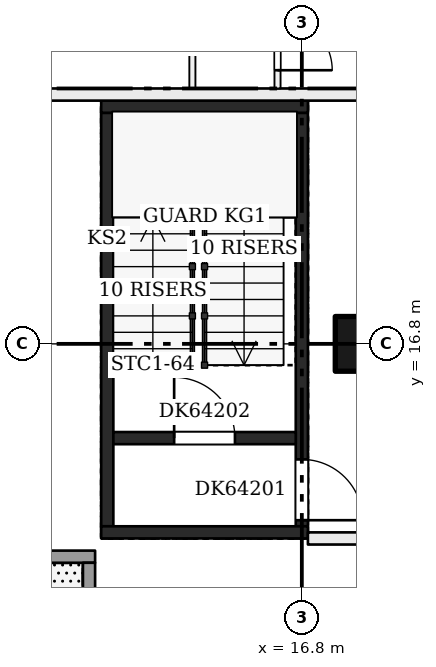
"""IFC4 building model, lengths in metres.
Left out: names, types, materials, properties, quantities, classifications, styles, units other than length and angle.
Written with IfcOpenShell. Run it as: python <this file> out.ifc"""

import sys

from ifc_helpers import new_model, si_unit, direction, frame, frame_2d, origin, origin_2d, place, context, subcontext, project, spatial, rectangle, extrude, element, fill, save


model = new_model("IFC4")
c1 = context("Model", 3, precision=1e-05, world=origin(), true_north=direction((0.0, 1.0)))
c2 = subcontext(c1, "Body", "Model", "MODEL_VIEW")
j1 = project(units=[si_unit("LENGTHUNIT", "METRE"), si_unit("PLANEANGLEUNIT", "RADIAN")], contexts=[c1])
p1 = place(None, origin())
s1 = spatial("IfcSite", under=j1, at=p1, CompositionType="ELEMENT")
p2 = place(p1, origin())
s2 = spatial("IfcBuilding", under=s1, at=p2, CompositionType="ELEMENT")
p3 = place(p2, frame((0.0, 0.0, 245.7)))
s3 = spatial("IfcBuildingStorey", under=s2, at=p3, CompositionType="ELEMENT", Elevation=245.7)
p4 = place(p3, frame((17.8, 16.8, 0.0), z_axis=(0.0, 0.0, 1.0), x_axis=(1.0, 0.0, 0.0)))
e1 = element("IfcColumn", 1, at=p4, inside=s3, PredefinedType="COLUMN", context=c2, shape_type="SweptSolid", body=[
    extrude(rectangle(XDim=0.9, YDim=0.9, at=origin_2d()), origin(), (0.0, 0.0, 1.0), 3.22),
])
p5 = place(p3, frame((13.6, 13.8, 0.0), z_axis=(0.0, 0.0, 1.0), x_axis=(0.0, 1.0, 0.0)))
e2 = element("IfcWall", 2, at=p5, inside=s3, PredefinedType="SHEAR", context=c2, shape_type="SweptSolid", body=[
    extrude(rectangle(XDim=6.8, YDim=0.2, at=frame_2d((3.4, 0.0))), origin(), (0.0, 0.0, 1.0), 3.22),
])
p6 = place(p3, frame((16.8, 13.8, 0.0), z_axis=(0.0, 0.0, 1.0), x_axis=(0.0, 1.0, 0.0)))
e3 = element("IfcWall", 3, at=p6, inside=s3, PredefinedType="SHEAR", context=c2, shape_type="SweptSolid", body=[
    extrude(rectangle(XDim=6.8, YDim=0.2, at=frame_2d((3.4, 0.0))), origin(), (0.0, 0.0, 1.0), 3.22),
])
p7 = place(p6, frame((0.1, 0.0, 0.0)))
e4 = element("IfcOpeningElement", 4, at=p7, cuts=e3, PredefinedType="OPENING", context=c2, shape_type="SweptSolid", body=[
    extrude(rectangle(XDim=1.0, YDim=2.1, at=frame_2d((0.5, 1.05))), frame((0.0, 0.11, 0.0), z_axis=(0.0, -1.0, 0.0), x_axis=(1.0, 0.0, 0.0)), (0.0, 0.0, 1.0), 0.22),
])
for number, where, z_axis, x_axis in (
    (5, (13.5, 13.7, 0.0), (0.0, 0.0, 1.0), (1.0, 0.0, 0.0)),
    (6, (13.5, 20.7, 0.0), (0.0, 0.0, 1.0), (1.0, 0.0, 0.0)),
):
    element("IfcWall", number, at=place(p3, frame(where, z_axis=z_axis, x_axis=x_axis)), inside=s3, PredefinedType="SHEAR", context=c2, shape_type="SweptSolid", body=[
        extrude(rectangle(XDim=3.4, YDim=0.2, at=frame_2d((1.7, 0.0))), origin(), (0.0, 0.0, 1.0), 3.22),
    ])
p8 = place(p3, frame((13.7, 15.25, 0.0), z_axis=(0.0, 0.0, 1.0), x_axis=(1.0, 0.0, 0.0)))
e7 = element("IfcWall", 7, at=p8, inside=s3, PredefinedType="SHEAR", context=c2, shape_type="SweptSolid", body=[
    extrude(rectangle(XDim=3.0, YDim=0.2, at=frame_2d((1.5, 0.0))), origin(), (0.0, 0.0, 1.0), 3.22),
])
p9 = place(p8, frame((1.0, 0.0, 0.0)))
e8 = element("IfcOpeningElement", 8, at=p9, cuts=e7, PredefinedType="OPENING", context=c2, shape_type="SweptSolid", body=[
    extrude(rectangle(XDim=1.0, YDim=2.1, at=frame_2d((0.5, 1.05))), frame((0.0, 0.11, 0.0), z_axis=(0.0, -1.0, 0.0), x_axis=(1.0, 0.0, 0.0)), (0.0, 0.0, 1.0), 0.22),
])
p10 = place(p3, frame((16.9, 13.6, 0.0), z_axis=(0.0, 0.0, 1.0), x_axis=(1.0, 0.0, 0.0)))
e9 = element("IfcWall", 9, at=p10, inside=s3, PredefinedType="PARTITIONING", context=c2, shape_type="SweptSolid", body=[
    extrude(rectangle(XDim=4.2, YDim=0.2, at=frame_2d((2.1, 0.0))), origin(), (0.0, 0.0, 1.0), 3.22),
])
p11 = place(p10, frame((1.6, 0.0, 0.0)))
e10 = element("IfcOpeningElement", 10, at=p11, cuts=e9, PredefinedType="OPENING", context=c2, shape_type="SweptSolid", body=[
    extrude(rectangle(XDim=1.0, YDim=2.1, at=frame_2d((0.5, 1.05))), frame((0.0, 0.11, 0.0), z_axis=(0.0, -1.0, 0.0), x_axis=(1.0, 0.0, 0.0)), (0.0, 0.0, 1.0), 0.22),
])
p12 = place(p3, frame((10.9, 20.9, 0.0), z_axis=(0.0, 0.0, 1.0), x_axis=(1.0, 0.0, 0.0)))
e11 = element("IfcWall", 11, at=p12, inside=s3, PredefinedType="PARTITIONING", context=c2, shape_type="SweptSolid", body=[
    extrude(rectangle(XDim=8.3, YDim=0.2, at=frame_2d((4.15, 0.0))), origin(), (0.0, 0.0, 1.0), 3.22),
])
p13 = place(p3, frame((15.0, 21.0, 0.0), z_axis=(0.0, 0.0, 1.0), x_axis=(0.0, 1.0, 0.0)))
e12 = element("IfcWall", 12, at=p13, inside=s3, PredefinedType="PARTITIONING", context=c2, shape_type="SweptSolid", body=[
    extrude(rectangle(XDim=19.0, YDim=0.1, at=frame_2d((9.5, 0.0))), origin(), (0.0, 0.0, 1.0), 3.22),
])
p14 = place(p13, frame((1.6, 0.0, 0.0)))
e13 = element("IfcOpeningElement", 13, at=p14, cuts=e12, PredefinedType="OPENING", context=c2, shape_type="SweptSolid", body=[
    extrude(rectangle(XDim=0.9, YDim=2.1, at=frame_2d((0.45, 1.05))), frame((0.0, 0.06, 0.0), z_axis=(0.0, -1.0, 0.0), x_axis=(1.0, 0.0, 0.0)), (0.0, 0.0, 1.0), 0.12),
])
p15 = place(p13, frame((5.8, 0.0, 0.0)))
e14 = element("IfcOpeningElement", 14, at=p15, cuts=e12, PredefinedType="OPENING", context=c2, shape_type="SweptSolid", body=[
    extrude(rectangle(XDim=0.9, YDim=2.1, at=frame_2d((0.45, 1.05))), frame((0.0, 0.06, 0.0), z_axis=(0.0, -1.0, 0.0), x_axis=(1.0, 0.0, 0.0)), (0.0, 0.0, 1.0), 0.12),
])
p16 = place(p13, frame((10.0, 0.0, 0.0)))
e15 = element("IfcOpeningElement", 15, at=p16, cuts=e12, PredefinedType="OPENING", context=c2, shape_type="SweptSolid", body=[
    extrude(rectangle(XDim=0.9, YDim=2.1, at=frame_2d((0.45, 1.05))), frame((0.0, 0.06, 0.0), z_axis=(0.0, -1.0, 0.0), x_axis=(1.0, 0.0, 0.0)), (0.0, 0.0, 1.0), 0.12),
])
p17 = place(p13, frame((15.4, 0.0, 0.0)))
e16 = element("IfcOpeningElement", 16, at=p17, cuts=e12, PredefinedType="OPENING", context=c2, shape_type="SweptSolid", body=[
    extrude(rectangle(XDim=0.9, YDim=2.1, at=frame_2d((0.45, 1.05))), frame((0.0, 0.06, 0.0), z_axis=(0.0, -1.0, 0.0), x_axis=(1.0, 0.0, 0.0)), (0.0, 0.0, 1.0), 0.12),
])
p18 = place(p3, frame((16.4, 21.0, 0.0), z_axis=(0.0, 0.0, 1.0), x_axis=(0.0, 1.0, 0.0)))
e17 = element("IfcWall", 17, at=p18, inside=s3, PredefinedType="PARTITIONING", context=c2, shape_type="SweptSolid", body=[
    extrude(rectangle(XDim=19.0, YDim=0.1, at=frame_2d((9.5, 0.0))), origin(), (0.0, 0.0, 1.0), 3.22),
])
p19 = place(p18, frame((2.6, 0.0, 0.0)))
e18 = element("IfcOpeningElement", 18, at=p19, cuts=e17, PredefinedType="OPENING", context=c2, shape_type="SweptSolid", body=[
    extrude(rectangle(XDim=0.9, YDim=2.1, at=frame_2d((0.45, 1.05))), frame((0.0, 0.06, 0.0), z_axis=(0.0, -1.0, 0.0), x_axis=(1.0, 0.0, 0.0)), (0.0, 0.0, 1.0), 0.12),
])
p20 = place(p18, frame((0.3, 0.0, 0.0)))
e19 = element("IfcOpeningElement", 19, at=p20, cuts=e17, PredefinedType="OPENING", context=c2, shape_type="SweptSolid", body=[
    extrude(rectangle(XDim=0.9, YDim=2.1, at=frame_2d((0.45, 1.05))), frame((0.0, 0.06, 0.0), z_axis=(0.0, -1.0, 0.0), x_axis=(1.0, 0.0, 0.0)), (0.0, 0.0, 1.0), 0.12),
])
p21 = place(p18, frame((7.3, 0.0, 0.0)))
e20 = element("IfcOpeningElement", 20, at=p21, cuts=e17, PredefinedType="OPENING", context=c2, shape_type="SweptSolid", body=[
    extrude(rectangle(XDim=0.9, YDim=2.1, at=frame_2d((0.45, 1.05))), frame((0.0, 0.06, 0.0), z_axis=(0.0, -1.0, 0.0), x_axis=(1.0, 0.0, 0.0)), (0.0, 0.0, 1.0), 0.12),
])
p22 = place(p18, frame((11.0, 0.0, 0.0)))
e21 = element("IfcOpeningElement", 21, at=p22, cuts=e17, PredefinedType="OPENING", context=c2, shape_type="SweptSolid", body=[
    extrude(rectangle(XDim=0.9, YDim=2.1, at=frame_2d((0.45, 1.05))), frame((0.0, 0.06, 0.0), z_axis=(0.0, -1.0, 0.0), x_axis=(1.0, 0.0, 0.0)), (0.0, 0.0, 1.0), 0.12),
])
p23 = place(p18, frame((16.1, 0.0, 0.0)))
e22 = element("IfcOpeningElement", 22, at=p23, cuts=e17, PredefinedType="OPENING", context=c2, shape_type="SweptSolid", body=[
    extrude(rectangle(XDim=0.9, YDim=2.1, at=frame_2d((0.45, 1.05))), frame((0.0, 0.06, 0.0), z_axis=(0.0, -1.0, 0.0), x_axis=(1.0, 0.0, 0.0)), (0.0, 0.0, 1.0), 0.12),
])
p24 = place(p3, frame((10.8, 13.3, 0.0), z_axis=(0.0, 0.0, 1.0), x_axis=(1.0, 0.0, 0.0)))
e23 = element("IfcWall", 23, at=p24, inside=s3, PredefinedType="SOLIDWALL", context=c2, shape_type="SweptSolid", body=[
    extrude(rectangle(XDim=2.6, YDim=0.2, at=frame_2d((1.3, 0.0))), origin(), (0.0, 0.0, 1.0), 3.22),
])
p25 = place(p3, frame((13.3, 13.2, 0.0), z_axis=(0.0, 0.0, 1.0), x_axis=(0.0, -1.0, 0.0)))
e24 = element("IfcWall", 24, at=p25, inside=s3, PredefinedType="SOLIDWALL", context=c2, shape_type="SweptSolid", body=[
    extrude(rectangle(XDim=2.2, YDim=0.2, at=frame_2d((1.1, 0.0))), origin(), (0.0, 0.0, 1.0), 3.22),
])
p26 = place(p7, frame((1.0, 0.0, 0.0), z_axis=(0.0, 0.0, 1.0), x_axis=(-1.0, 0.0, 0.0)))
e25 = element("IfcDoor", 25, at=p26, inside=s3, OperationType="SINGLE_SWING_RIGHT", PredefinedType="DOOR", context=c2, shape_type="SweptSolid", body=[
    extrude(rectangle(XDim=1.0, YDim=2.1, at=frame_2d((0.5, 1.05))), frame((0.0, 0.025, 0.0), z_axis=(0.0, -1.0, 0.0), x_axis=(1.0, 0.0, 0.0)), (0.0, 0.0, 1.0), 0.05),
])
fill(e4, e25)
p27 = place(p9, origin())
e26 = element("IfcDoor", 26, at=p27, inside=s3, OperationType="SINGLE_SWING_LEFT", PredefinedType="DOOR", context=c2, shape_type="SweptSolid", body=[
    extrude(rectangle(XDim=1.0, YDim=2.1, at=frame_2d((0.5, 1.05))), frame((0.0, 0.025, 0.0), z_axis=(0.0, -1.0, 0.0), x_axis=(1.0, 0.0, 0.0)), (0.0, 0.0, 1.0), 0.05),
])
fill(e8, e26)
p28 = place(p20, frame((0.9, 0.0, 0.0), z_axis=(0.0, 0.0, 1.0), x_axis=(-1.0, 0.0, 0.0)))
e27 = element("IfcDoor", 27, at=p28, inside=s3, OperationType="SINGLE_SWING_RIGHT", PredefinedType="DOOR", context=c2, shape_type="SweptSolid", body=[
    extrude(rectangle(XDim=0.9, YDim=2.1, at=frame_2d((0.45, 1.05))), frame((0.0, 0.025, 0.0), z_axis=(0.0, -1.0, 0.0), x_axis=(1.0, 0.0, 0.0)), (0.0, 0.0, 1.0), 0.05),
])
fill(e19, e27)
save(model, sys.argv[1])
